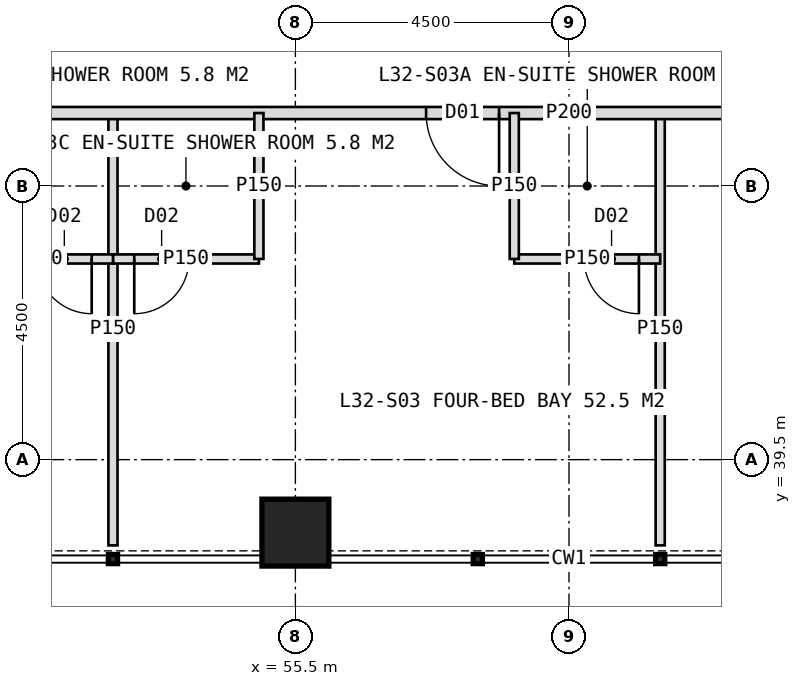
"""IFC4 building model, lengths in metres.
Left out: names, types, materials, properties, quantities, classifications, styles, units other than length and angle.
Written with IfcOpenShell. Run it as: python <this file> out.ifc"""

import sys

from ifc_helpers import new_model, si_unit, direction, frame, frame_2d, origin, origin_2d, place, context, subcontext, project, spatial, rectangle, hollow_rectangle, extrude, element, fill, save


model = new_model("IFC4")
c1 = context("Model", 3, precision=1e-05, world=origin(), true_north=direction((0.0, 1.0)))
c2 = subcontext(c1, "Body", "Model", "MODEL_VIEW")
j1 = project(units=[si_unit("LENGTHUNIT", "METRE"), si_unit("PLANEANGLEUNIT", "RADIAN")], contexts=[c1])
p1 = place(None, origin())
s1 = spatial("IfcSite", under=j1, at=p1, CompositionType="ELEMENT")
p2 = place(p1, origin())
s2 = spatial("IfcBuilding", under=s1, at=p2, CompositionType="ELEMENT")
p3 = place(p2, frame((0.0, 0.0, 136.0)))
s3 = spatial("IfcBuildingStorey", under=s2, at=p3, CompositionType="ELEMENT", Elevation=136.0)
p4 = place(p3, frame((55.5, 38.3, 0.0), z_axis=(0.0, 0.0, 1.0), x_axis=(1.0, 0.0, 0.0)))
e1 = element("IfcColumn", 1, at=p4, inside=s3, PredefinedType="COLUMN", context=c2, shape_type="SweptSolid", body=[
    extrude(hollow_rectangle(XDim=1.1, YDim=1.1, WallThickness=0.1, at=origin_2d()), origin(), (0.0, 0.0, 1.0), 4.0),
])
for number, where, z_axis, x_axis in (
    (2, (61.5, 45.2, 0.0), (0.0, 0.0, 1.0), (0.0, -1.0, 0.0)),
    (3, (52.5, 45.2, 0.0), (0.0, 0.0, 1.0), (0.0, -1.0, 0.0)),
):
    element("IfcWall", number, at=place(p3, frame(where, z_axis=z_axis, x_axis=x_axis)), inside=s3, PredefinedType="PARTITIONING", context=c2, shape_type="SweptSolid", body=[
        extrude(rectangle(XDim=7.11, YDim=0.15, at=frame_2d((3.555, 0.0))), origin(), (0.0, 0.0, 1.0), 3.75),
    ])
p5 = place(p3, frame((76.8, 45.2, 0.0), z_axis=(0.0, 0.0, 1.0), x_axis=(-1.0, 0.0, 0.0)))
e4 = element("IfcWall", 4, at=p5, inside=s3, PredefinedType="PARTITIONING", context=c2, shape_type="SweptSolid", body=[
    extrude(rectangle(XDim=33.6, YDim=0.2, at=frame_2d((16.8, 0.0))), origin(), (0.0, 0.0, 1.0), 3.75),
])
p6 = place(p5, frame((2.65, 0.0, 0.0)))
e5 = element("IfcOpeningElement", 5, at=p6, cuts=e4, PredefinedType="OPENING", context=c2, shape_type="SweptSolid", body=[
    extrude(rectangle(XDim=1.2, YDim=2.2, at=frame_2d((0.6, 1.1))), frame((0.0, 0.11, 0.0), z_axis=(0.0, -1.0, 0.0), x_axis=(1.0, 0.0, 0.0)), (0.0, 0.0, 1.0), 0.22),
])
p7 = place(p5, frame((11.05, 0.0, 0.0)))
e6 = element("IfcOpeningElement", 6, at=p7, cuts=e4, PredefinedType="OPENING", context=c2, shape_type="SweptSolid", body=[
    extrude(rectangle(XDim=1.2, YDim=2.2, at=frame_2d((0.6, 1.1))), frame((0.0, 0.11, 0.0), z_axis=(0.0, -1.0, 0.0), x_axis=(1.0, 0.0, 0.0)), (0.0, 0.0, 1.0), 0.22),
])
p8 = place(p5, frame((17.95, 0.0, 0.0)))
e7 = element("IfcOpeningElement", 7, at=p8, cuts=e4, PredefinedType="OPENING", context=c2, shape_type="SweptSolid", body=[
    extrude(rectangle(XDim=1.2, YDim=2.2, at=frame_2d((0.6, 1.1))), frame((0.0, 0.11, 0.0), z_axis=(0.0, -1.0, 0.0), x_axis=(1.0, 0.0, 0.0)), (0.0, 0.0, 1.0), 0.22),
])
p9 = place(p5, frame((26.95, 0.0, 0.0)))
e8 = element("IfcOpeningElement", 8, at=p9, cuts=e4, PredefinedType="OPENING", context=c2, shape_type="SweptSolid", body=[
    extrude(rectangle(XDim=1.2, YDim=2.2, at=frame_2d((0.6, 1.1))), frame((0.0, 0.11, 0.0), z_axis=(0.0, -1.0, 0.0), x_axis=(1.0, 0.0, 0.0)), (0.0, 0.0, 1.0), 0.22),
])
p10 = place(p3, frame((61.5, 42.8, 0.0), z_axis=(0.0, 0.0, 1.0), x_axis=(-1.0, 0.0, 0.0)))
e9 = element("IfcWall", 9, at=p10, inside=s3, PredefinedType="PARTITIONING", context=c2, shape_type="SweptSolid", body=[
    extrude(rectangle(XDim=2.4, YDim=0.15, at=frame_2d((1.2, 0.0))), origin(), (0.0, 0.0, 1.0), 3.75),
])
p11 = place(p10, frame((0.35, 0.0, 0.0)))
e10 = element("IfcOpeningElement", 10, at=p11, cuts=e9, PredefinedType="OPENING", context=c2, shape_type="SweptSolid", body=[
    extrude(rectangle(XDim=0.9, YDim=2.1, at=frame_2d((0.45, 1.05))), frame((0.0, 0.085, 0.0), z_axis=(0.0, -1.0, 0.0), x_axis=(1.0, 0.0, 0.0)), (0.0, 0.0, 1.0), 0.17),
])
p12 = place(p3, frame((59.1, 45.2, 0.0), z_axis=(0.0, 0.0, 1.0), x_axis=(0.0, -1.0, 0.0)))
e11 = element("IfcWall", 11, at=p12, inside=s3, PredefinedType="PARTITIONING", context=c2, shape_type="SweptSolid", body=[
    extrude(rectangle(XDim=2.4, YDim=0.15, at=frame_2d((1.2, 0.0))), origin(), (0.0, 0.0, 1.0), 3.75),
])
p13 = place(p3, frame((54.9, 42.8, 0.0), z_axis=(0.0, 0.0, 1.0), x_axis=(-1.0, 0.0, 0.0)))
e12 = element("IfcWall", 12, at=p13, inside=s3, PredefinedType="PARTITIONING", context=c2, shape_type="SweptSolid", body=[
    extrude(rectangle(XDim=2.4, YDim=0.15, at=frame_2d((1.2, 0.0))), origin(), (0.0, 0.0, 1.0), 3.75),
])
p14 = place(p13, frame((1.15, 0.0, 0.0)))
e13 = element("IfcOpeningElement", 13, at=p14, cuts=e12, PredefinedType="OPENING", context=c2, shape_type="SweptSolid", body=[
    extrude(rectangle(XDim=0.9, YDim=2.1, at=frame_2d((0.45, 1.05))), frame((0.0, 0.085, 0.0), z_axis=(0.0, -1.0, 0.0), x_axis=(1.0, 0.0, 0.0)), (0.0, 0.0, 1.0), 0.17),
])
p15 = place(p3, frame((54.9, 45.2, 0.0), z_axis=(0.0, 0.0, 1.0), x_axis=(0.0, -1.0, 0.0)))
e14 = element("IfcWall", 14, at=p15, inside=s3, PredefinedType="PARTITIONING", context=c2, shape_type="SweptSolid", body=[
    extrude(rectangle(XDim=2.4, YDim=0.15, at=frame_2d((1.2, 0.0))), origin(), (0.0, 0.0, 1.0), 3.75),
])
p16 = place(p3, frame((52.5, 42.8, 0.0), z_axis=(0.0, 0.0, 1.0), x_axis=(-1.0, 0.0, 0.0)))
e15 = element("IfcWall", 15, at=p16, inside=s3, PredefinedType="PARTITIONING", context=c2, shape_type="SweptSolid", body=[
    extrude(rectangle(XDim=2.4, YDim=0.15, at=frame_2d((1.2, 0.0))), origin(), (0.0, 0.0, 1.0), 3.75),
])
p17 = place(p16, frame((0.35, 0.0, 0.0)))
e16 = element("IfcOpeningElement", 16, at=p17, cuts=e15, PredefinedType="OPENING", context=c2, shape_type="SweptSolid", body=[
    extrude(rectangle(XDim=0.9, YDim=2.1, at=frame_2d((0.45, 1.05))), frame((0.0, 0.085, 0.0), z_axis=(0.0, -1.0, 0.0), x_axis=(1.0, 0.0, 0.0)), (0.0, 0.0, 1.0), 0.17),
])
p18 = place(p8, origin())
e17 = element("IfcDoor", 17, at=p18, inside=s3, OperationType="SINGLE_SWING_LEFT", PredefinedType="DOOR", context=c2, shape_type="SweptSolid", body=[
    extrude(rectangle(XDim=1.2, YDim=2.2, at=frame_2d((0.6, 1.1))), frame((0.0, 0.025, 0.0), z_axis=(0.0, -1.0, 0.0), x_axis=(1.0, 0.0, 0.0)), (0.0, 0.0, 1.0), 0.05),
])
fill(e7, e17)
p19 = place(p11, origin())
e18 = element("IfcDoor", 18, at=p19, inside=s3, OperationType="SINGLE_SWING_LEFT", PredefinedType="DOOR", context=c2, shape_type="SweptSolid", body=[
    extrude(rectangle(XDim=0.9, YDim=2.1, at=frame_2d((0.45, 1.05))), frame((0.0, 0.025, 0.0), z_axis=(0.0, -1.0, 0.0), x_axis=(1.0, 0.0, 0.0)), (0.0, 0.0, 1.0), 0.05),
])
fill(e10, e18)
p20 = place(p14, origin())
e19 = element("IfcDoor", 19, at=p20, inside=s3, OperationType="SINGLE_SWING_RIGHT", PredefinedType="DOOR", context=c2, shape_type="SweptSolid", body=[
    extrude(rectangle(XDim=0.9, YDim=2.1, at=frame_2d((0.45, 1.05))), frame((0.0, 0.025, 0.0), z_axis=(0.0, -1.0, 0.0), x_axis=(1.0, 0.0, 0.0)), (0.0, 0.0, 1.0), 0.05),
])
fill(e13, e19)
p21 = place(p17, origin())
e20 = element("IfcDoor", 20, at=p21, inside=s3, OperationType="SINGLE_SWING_LEFT", PredefinedType="DOOR", context=c2, shape_type="SweptSolid", body=[
    extrude(rectangle(XDim=0.9, YDim=2.1, at=frame_2d((0.45, 1.05))), frame((0.0, 0.025, 0.0), z_axis=(0.0, -1.0, 0.0), x_axis=(1.0, 0.0, 0.0)), (0.0, 0.0, 1.0), 0.05),
])
fill(e16, e20)
save(model, sys.argv[1])
